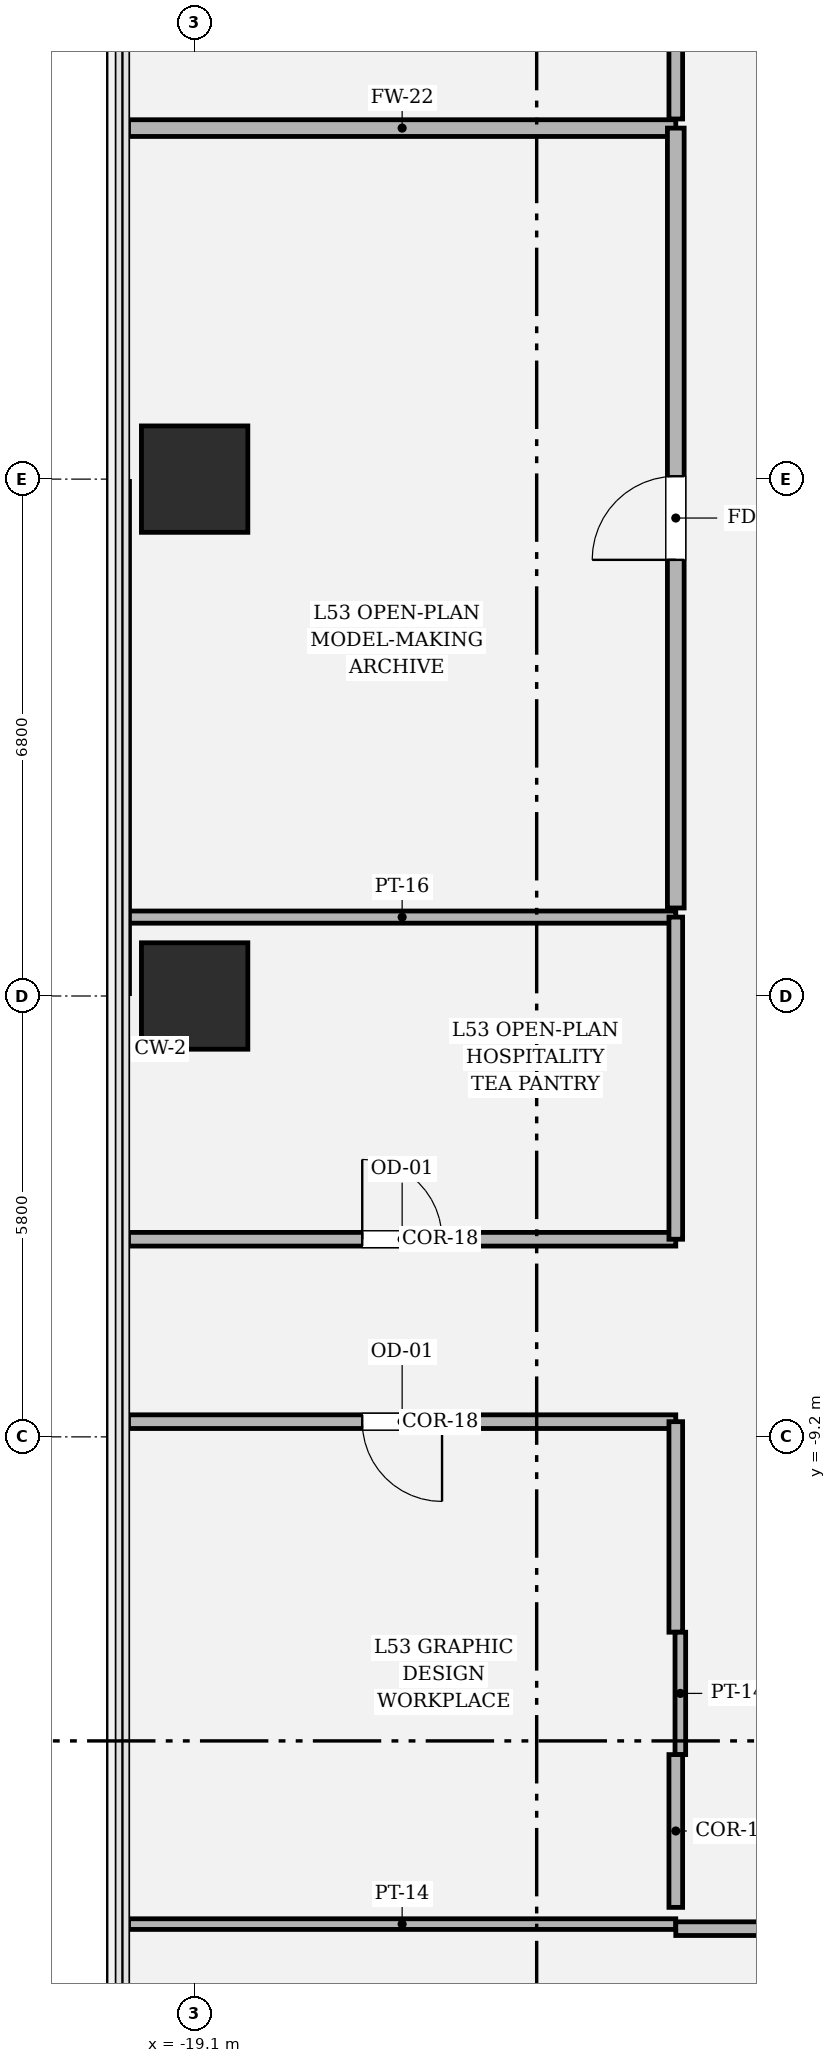
"""IFC4 building model, lengths in metres.
Left out: names, types, materials, properties, quantities, classifications, styles, units other than length and angle.
Written with IfcOpenShell. Run it as: python <this file> out.ifc"""

import sys

from ifc_helpers import new_model, si_unit, direction, frame, frame_2d, origin, origin_2d, place, context, subcontext, project, spatial, rectangle, hollow_rectangle, extrude, element, fill, save


model = new_model("IFC4")
c1 = context("Model", 3, precision=1e-05, world=origin(), true_north=direction((0.0, 1.0)))
c2 = subcontext(c1, "Body", "Model", "MODEL_VIEW")
j1 = project(units=[si_unit("LENGTHUNIT", "METRE"), si_unit("PLANEANGLEUNIT", "RADIAN")], contexts=[c1])
p1 = place(None, origin())
s1 = spatial("IfcSite", under=j1, at=p1, CompositionType="ELEMENT")
p2 = place(p1, origin())
s2 = spatial("IfcBuilding", under=s1, at=p2, CompositionType="ELEMENT")
p3 = place(p2, frame((0.0, 0.0, 224.85)))
s3 = spatial("IfcBuildingStorey", under=s2, at=p3, CompositionType="ELEMENT", Elevation=224.85)
for number, where, z_axis, x_axis in (
    (1, (-19.1, 3.4, 0.0), (0.0, 0.0, 1.0), (1.0, 0.0, 0.0)),
    (2, (-19.1, -3.4, 0.0), (0.0, 0.0, 1.0), (1.0, 0.0, 0.0)),
):
    element("IfcColumn", number, at=place(p3, frame(where, z_axis=z_axis, x_axis=x_axis)), inside=s3, PredefinedType="COLUMN", context=c2, shape_type="SweptSolid", body=[
        extrude(hollow_rectangle(XDim=1.4, YDim=1.4, WallThickness=0.042, at=origin_2d()), origin(), (0.0, 0.0, 1.0), 4.05),
    ])
p4 = place(p3, frame((-19.97, -15.61, 0.0), z_axis=(0.0, 0.0, 1.0), x_axis=(1.0, 0.0, 0.0)))
e3 = element("IfcWall", 3, at=p4, inside=s3, PredefinedType="PARTITIONING", context=c2, shape_type="SweptSolid", body=[
    extrude(rectangle(XDim=7.2, YDim=0.14, at=frame_2d((3.6, 0.0))), origin(), (0.0, 0.0, 1.0), 3.174),
])
p5 = place(p3, frame((-12.77, -15.67, 0.0), z_axis=(0.0, 0.0, 1.0), x_axis=(1.0, 0.0, 0.0)))
e4 = element("IfcWall", 4, at=p5, inside=s3, PredefinedType="PARTITIONING", context=c2, shape_type="SweptSolid", body=[
    extrude(rectangle(XDim=4.924, YDim=0.18, at=frame_2d((2.462, 0.0))), origin(), (0.0, 0.0, 1.0), 3.174),
])
p6 = place(p5, frame((1.937, 0.0, 0.0)))
e5 = element("IfcOpeningElement", 5, at=p6, cuts=e4, PredefinedType="OPENING", context=c2, shape_type="SweptSolid", body=[
    extrude(rectangle(XDim=1.05, YDim=2.2, at=frame_2d((0.525, 1.1))), frame((0.0, 0.1, 0.0), z_axis=(0.0, -1.0, 0.0), x_axis=(1.0, 0.0, 0.0)), (0.0, 0.0, 1.0), 0.2),
])
p7 = place(p3, frame((-19.97, -9.0, 0.0), z_axis=(0.0, 0.0, 1.0), x_axis=(1.0, 0.0, 0.0)))
e6 = element("IfcWall", 6, at=p7, inside=s3, PredefinedType="PARTITIONING", context=c2, shape_type="SweptSolid", body=[
    extrude(rectangle(XDim=7.2, YDim=0.18, at=frame_2d((3.6, 0.0))), origin(), (0.0, 0.0, 1.0), 3.174),
])
p8 = place(p7, frame((3.075, 0.0, 0.0)))
e7 = element("IfcOpeningElement", 7, at=p8, cuts=e6, PredefinedType="OPENING", context=c2, shape_type="SweptSolid", body=[
    extrude(rectangle(XDim=1.05, YDim=2.2, at=frame_2d((0.525, 1.1))), frame((0.0, 0.1, 0.0), z_axis=(0.0, -1.0, 0.0), x_axis=(1.0, 0.0, 0.0)), (0.0, 0.0, 1.0), 0.2),
])
p9 = place(p3, frame((-12.77, -9.0, 0.0), z_axis=(0.0, 0.0, 1.0), x_axis=(0.0, -1.0, 0.0)))
e8 = element("IfcWall", 8, at=p9, inside=s3, PredefinedType="PARTITIONING", context=c2, shape_type="SweptSolid", body=[
    extrude(rectangle(XDim=2.77, YDim=0.18, at=frame_2d((1.385, 0.0))), origin(), (0.0, 0.0, 1.0), 3.174),
])
p10 = place(p3, frame((-12.71, -11.77, 0.0), z_axis=(0.0, 0.0, 1.0), x_axis=(0.0, -1.0, 0.0)))
e9 = element("IfcWall", 9, at=p10, inside=s3, PredefinedType="PARTITIONING", context=c2, shape_type="SweptSolid", body=[
    extrude(rectangle(XDim=1.61, YDim=0.14, at=frame_2d((0.805, 0.0))), origin(), (0.0, 0.0, 1.0), 3.424),
])
p11 = place(p3, frame((-12.77, -13.38, 0.0), z_axis=(0.0, 0.0, 1.0), x_axis=(0.0, -1.0, 0.0)))
e10 = element("IfcWall", 10, at=p11, inside=s3, PredefinedType="PARTITIONING", context=c2, shape_type="SweptSolid", body=[
    extrude(rectangle(XDim=2.01, YDim=0.18, at=frame_2d((1.005, 0.0))), origin(), (0.0, 0.0, 1.0), 3.424),
])
p12 = place(p3, frame((-12.77, -6.6, 0.0), z_axis=(0.0, 0.0, 1.0), x_axis=(-1.0, 0.0, 0.0)))
e11 = element("IfcWall", 11, at=p12, inside=s3, PredefinedType="PARTITIONING", context=c2, shape_type="SweptSolid", body=[
    extrude(rectangle(XDim=7.2, YDim=0.18, at=frame_2d((3.6, 0.0))), origin(), (0.0, 0.0, 1.0), 3.174),
])
p13 = place(p12, frame((3.075, 0.0, 0.0)))
e12 = element("IfcOpeningElement", 12, at=p13, cuts=e11, PredefinedType="OPENING", context=c2, shape_type="SweptSolid", body=[
    extrude(rectangle(XDim=1.05, YDim=2.2, at=frame_2d((0.525, 1.1))), frame((0.0, 0.1, 0.0), z_axis=(0.0, -1.0, 0.0), x_axis=(1.0, 0.0, 0.0)), (0.0, 0.0, 1.0), 0.2),
])
p14 = place(p3, frame((-19.97, -2.362, 0.0), z_axis=(0.0, 0.0, 1.0), x_axis=(1.0, 0.0, 0.0)))
e13 = element("IfcWall", 13, at=p14, inside=s3, PredefinedType="PARTITIONING", context=c2, shape_type="SweptSolid", body=[
    extrude(rectangle(XDim=7.2, YDim=0.16, at=frame_2d((3.6, 0.0))), origin(), (0.0, 0.0, 1.0), 3.174),
])
p15 = place(p3, frame((-12.77, -2.362, 0.0), z_axis=(0.0, 0.0, 1.0), x_axis=(0.0, -1.0, 0.0)))
e14 = element("IfcWall", 14, at=p15, inside=s3, PredefinedType="PARTITIONING", context=c2, shape_type="SweptSolid", body=[
    extrude(rectangle(XDim=4.238, YDim=0.18, at=frame_2d((2.119, 0.0))), origin(), (0.0, 0.0, 1.0), 3.174),
])
p16 = place(p3, frame((-19.97, 8.018, 0.0), z_axis=(0.0, 0.0, 1.0), x_axis=(1.0, 0.0, 0.0)))
e15 = element("IfcWall", 15, at=p16, inside=s3, PredefinedType="SOLIDWALL", context=c2, shape_type="SweptSolid", body=[
    extrude(rectangle(XDim=7.2, YDim=0.22, at=frame_2d((3.6, 0.0))), origin(), (0.0, 0.0, 1.0), 3.174),
])
p17 = place(p3, frame((-12.77, 8.018, 0.0), z_axis=(0.0, 0.0, 1.0), x_axis=(0.0, -1.0, 0.0)))
e16 = element("IfcWall", 16, at=p17, inside=s3, PredefinedType="SOLIDWALL", context=c2, shape_type="SweptSolid", body=[
    extrude(rectangle(XDim=10.26, YDim=0.22, at=frame_2d((5.13, 0.0))), origin(), (0.0, 0.0, 1.0), 3.174),
])
p18 = place(p17, frame((4.58, 0.0, 0.0)))
e17 = element("IfcOpeningElement", 17, at=p18, cuts=e16, PredefinedType="OPENING", context=c2, shape_type="SweptSolid", body=[
    extrude(rectangle(XDim=1.1, YDim=2.2, at=frame_2d((0.55, 1.1))), frame((0.0, 0.12, 0.0), z_axis=(0.0, -1.0, 0.0), x_axis=(1.0, 0.0, 0.0)), (0.0, 0.0, 1.0), 0.24),
])
p19 = place(p3, frame((-12.77, 18.37, 0.0), z_axis=(0.0, 0.0, 1.0), x_axis=(0.0, -1.0, 0.0)))
e18 = element("IfcWall", 18, at=p19, inside=s3, PredefinedType="PARTITIONING", context=c2, shape_type="SweptSolid", body=[
    extrude(rectangle(XDim=10.232, YDim=0.18, at=frame_2d((5.116, 0.0))), origin(), (0.0, 0.0, 1.0), 3.174),
])
p20 = place(p19, frame((6.856, 0.0, 0.0)))
e19 = element("IfcOpeningElement", 19, at=p20, cuts=e18, PredefinedType="OPENING", context=c2, shape_type="SweptSolid", body=[
    extrude(rectangle(XDim=1.02, YDim=2.2, at=frame_2d((0.51, 1.1))), frame((0.0, 0.1, 0.0), z_axis=(0.0, -1.0, 0.0), x_axis=(1.0, 0.0, 0.0)), (0.0, 0.0, 1.0), 0.2),
])
p21 = place(p8, origin())
e20 = element("IfcDoor", 20, at=p21, inside=s3, OperationType="SINGLE_SWING_RIGHT", PredefinedType="DOOR", context=c2, shape_type="SweptSolid", body=[
    extrude(rectangle(XDim=1.05, YDim=2.2, at=frame_2d((0.525, 1.1))), frame((0.0, 0.025, 0.0), z_axis=(0.0, -1.0, 0.0), x_axis=(1.0, 0.0, 0.0)), (0.0, 0.0, 1.0), 0.05),
])
fill(e7, e20)
p22 = place(p13, origin())
e21 = element("IfcDoor", 21, at=p22, inside=s3, OperationType="SINGLE_SWING_RIGHT", PredefinedType="DOOR", context=c2, shape_type="SweptSolid", body=[
    extrude(rectangle(XDim=1.05, YDim=2.2, at=frame_2d((0.525, 1.1))), frame((0.0, 0.025, 0.0), z_axis=(0.0, -1.0, 0.0), x_axis=(1.0, 0.0, 0.0)), (0.0, 0.0, 1.0), 0.05),
])
fill(e12, e21)
p23 = place(p18, origin())
e22 = element("IfcDoor", 22, at=p23, inside=s3, OperationType="SINGLE_SWING_RIGHT", PredefinedType="DOOR", context=c2, shape_type="SweptSolid", body=[
    extrude(rectangle(XDim=1.1, YDim=2.2, at=frame_2d((0.55, 1.1))), frame((0.0, 0.025, 0.0), z_axis=(0.0, -1.0, 0.0), x_axis=(1.0, 0.0, 0.0)), (0.0, 0.0, 1.0), 0.05),
])
fill(e17, e22)
save(model, sys.argv[1])
